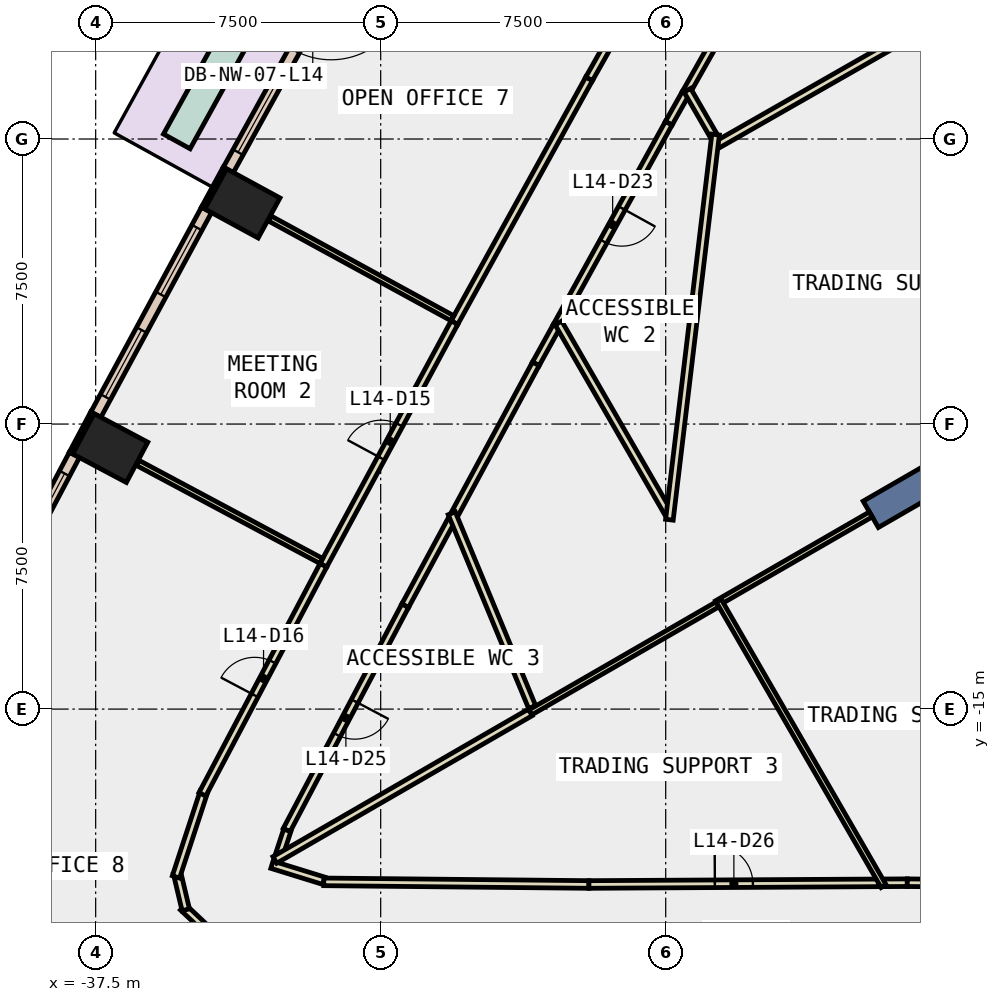
"""IFC4 building model, lengths in metres.
Left out: names, types, materials, properties, quantities, classifications, styles, units other than length and angle.
Written with IfcOpenShell. Run it as: python <this file> out.ifc"""

import sys

from ifc_helpers import new_model, si_unit, direction, frame, frame_2d, origin, origin_2d, place, context, subcontext, project, spatial, rectangle, extrude, element, fill, save


model = new_model("IFC4")
c1 = context("Model", 3, precision=1e-05, world=origin(), true_north=direction((0.0, 1.0)))
c2 = subcontext(c1, "Body", "Model", "MODEL_VIEW")
j1 = project(units=[si_unit("LENGTHUNIT", "METRE"), si_unit("PLANEANGLEUNIT", "RADIAN")], contexts=[c1])
p1 = place(None, origin())
s1 = spatial("IfcSite", under=j1, at=p1, CompositionType="ELEMENT")
p2 = place(p1, origin())
s2 = spatial("IfcBuilding", under=s1, at=p2, CompositionType="ELEMENT")
p3 = place(p2, frame((0.0, 0.0, 68.6)))
s3 = spatial("IfcBuildingStorey", under=s2, at=p3, CompositionType="ELEMENT", Elevation=68.6)
for number, where, z_axis, x_axis in (
    (1, (-33.64, -1.695, -0.4), (0.0, 0.0, 1.0), (0.478, 0.878, 0.0)),
    (2, (-37.117, -8.132, -0.4), (0.0, 0.0, 1.0), (0.469, 0.883, 0.0)),
):
    element("IfcColumn", number, at=place(p3, frame(where, z_axis=z_axis, x_axis=x_axis)), inside=s3, PredefinedType="COLUMN", context=c2, shape_type="SweptSolid", body=[
        extrude(rectangle(XDim=1.2, YDim=1.6, at=origin_2d()), origin(), (0.0, 0.0, 1.0), 4.2),
    ])
p4 = place(p3, frame((-9.31, -5.375, -0.4), z_axis=(0.0, 0.0, 1.0), x_axis=(-0.866017533419, -0.500013631625, 0.0)))
e3 = element("IfcWall", 3, at=p4, inside=s3, PredefinedType="SHEAR", context=c2, shape_type="SweptSolid", body=[
    extrude(rectangle(XDim=9.0, YDim=0.8, at=frame_2d((4.5, 0.0))), origin(), (0.0, 0.0, 1.0), 4.2),
])
p5 = place(p3, frame((-34.099, -0.762, 0.0), z_axis=(0.0, 0.0, 1.0), x_axis=(-0.478267644701, -0.878214131082, 0.0)))
e4 = element("IfcWall", 4, at=p5, inside=s3, PredefinedType="STANDARD", context=c2, shape_type="SweptSolid", body=[
    extrude(rectangle(XDim=1.2, YDim=0.1, at=frame_2d((0.6, 0.0))), origin(), (0.0, 0.0, 1.0), 3.8),
])
p6 = place(p3, frame((-37.586, -7.204, 0.0), z_axis=(0.0, 0.0, 1.0), x_axis=(-0.469467784567, -0.882949601763, 0.0)))
e5 = element("IfcWall", 5, at=p6, inside=s3, PredefinedType="STANDARD", context=c2, shape_type="SweptSolid", body=[
    extrude(rectangle(XDim=1.199, YDim=0.1, at=frame_2d((0.6, 0.0))), origin(), (0.0, 0.0, 1.0), 3.8),
])
p7 = place(p3, frame((-31.047, 4.549, 0.0), z_axis=(0.0, 0.0, 1.0), x_axis=(-0.483587271547, -0.875296150339, 0.0)))
e6 = element("IfcWall", 6, at=p7, inside=s3, PredefinedType="STANDARD", context=c2, shape_type="SweptSolid", body=[
    extrude(rectangle(XDim=6.125, YDim=0.3, at=frame_2d((3.062, 0.0))), origin(), (0.0, 0.0, 1.0), 3.8),
])
p8 = place(p7, frame((0.531, 0.0, 0.0)))
e7 = element("IfcOpeningElement", 7, at=p8, cuts=e6, PredefinedType="OPENING", context=c2, shape_type="SweptSolid", body=[
    extrude(rectangle(XDim=2.0, YDim=2.4, at=frame_2d((1.0, 1.2))), frame((0.0, 0.16, 0.0), z_axis=(0.0, -1.0, 0.0), x_axis=(1.0, 0.0, 0.0)), (0.0, 0.0, 1.0), 0.32),
])
p9 = place(p7, frame((3.594, 0.0, 0.9)))
e8 = element("IfcOpeningElement", 8, at=p9, cuts=e6, PredefinedType="OPENING", context=c2, shape_type="SweptSolid", body=[
    extrude(rectangle(XDim=2.0, YDim=2.6, at=frame_2d((1.0, 1.3))), frame((0.0, 0.16, 0.0), z_axis=(0.0, -1.0, 0.0), x_axis=(1.0, 0.0, 0.0)), (0.0, 0.0, 1.0), 0.32),
])
p10 = place(p3, frame((-34.583, -1.864, 0.0), z_axis=(0.0, 0.0, 1.0), x_axis=(-0.475413659872, -0.879762383833, 0.0)))
e9 = element("IfcWall", 9, at=p10, inside=s3, PredefinedType="STANDARD", context=c2, shape_type="SweptSolid", body=[
    extrude(rectangle(XDim=6.125, YDim=0.3, at=frame_2d((3.063, 0.0))), origin(), (0.0, 0.0, 1.0), 3.8),
])
p11 = place(p10, frame((0.531, 0.0, 0.9)))
e10 = element("IfcOpeningElement", 10, at=p11, cuts=e9, PredefinedType="OPENING", context=c2, shape_type="SweptSolid", body=[
    extrude(rectangle(XDim=2.0, YDim=2.6, at=frame_2d((1.0, 1.3))), frame((0.0, 0.16, 0.0), z_axis=(0.0, -1.0, 0.0), x_axis=(1.0, 0.0, 0.0)), (0.0, 0.0, 1.0), 0.32),
])
p12 = place(p10, frame((3.594, 0.0, 0.9)))
e11 = element("IfcOpeningElement", 11, at=p12, cuts=e9, PredefinedType="OPENING", context=c2, shape_type="SweptSolid", body=[
    extrude(rectangle(XDim=2.0, YDim=2.6, at=frame_2d((1.0, 1.3))), frame((0.0, 0.16, 0.0), z_axis=(0.0, -1.0, 0.0), x_axis=(1.0, 0.0, 0.0)), (0.0, 0.0, 1.0), 0.32),
])
p13 = place(p3, frame((-38.059, -8.31, 0.0), z_axis=(0.0, 0.0, 1.0), x_axis=(-0.467041710902, -0.884235285587, 0.0)))
e12 = element("IfcWall", 12, at=p13, inside=s3, PredefinedType="STANDARD", context=c2, shape_type="SweptSolid", body=[
    extrude(rectangle(XDim=6.22, YDim=0.3, at=frame_2d((3.11, 0.0))), origin(), (0.0, 0.0, 1.0), 3.8),
])
p14 = place(p13, frame((0.555, 0.0, 0.9)))
e13 = element("IfcOpeningElement", 13, at=p14, cuts=e12, PredefinedType="OPENING", context=c2, shape_type="SweptSolid", body=[
    extrude(rectangle(XDim=2.0, YDim=2.6, at=frame_2d((1.0, 1.3))), frame((0.0, 0.16, 0.0), z_axis=(0.0, -1.0, 0.0), x_axis=(1.0, 0.0, 0.0)), (0.0, 0.0, 1.0), 0.32),
])
p15 = place(p13, frame((3.665, 0.0, 0.9)))
e14 = element("IfcOpeningElement", 14, at=p15, cuts=e12, PredefinedType="OPENING", context=c2, shape_type="SweptSolid", body=[
    extrude(rectangle(XDim=2.0, YDim=2.6, at=frame_2d((1.0, 1.3))), frame((0.0, 0.16, 0.0), z_axis=(0.0, -1.0, 0.0), x_axis=(1.0, 0.0, 0.0)), (0.0, 0.0, 1.0), 0.32),
])
p16 = place(p3, frame((-32.404, 5.298, 0.0), z_axis=(0.0, 0.0, 1.0), x_axis=(-0.48346510207, -0.875363635914, 0.0)))
e15 = element("IfcWall", 15, at=p16, inside=s3, PredefinedType="STANDARD", context=c2, shape_type="SweptSolid", body=[
    extrude(rectangle(XDim=6.125, YDim=0.8, at=frame_2d((3.062, 0.0))), origin(), (0.0, 0.0, 1.0), 0.8),
])
p17 = place(p3, frame((-18.945, 6.567, 0.0), z_axis=(0.0, 0.0, 1.0), x_axis=(-0.491840751019, -0.87068517596, 0.0)))
e16 = element("IfcWall", 16, at=p17, inside=s3, PredefinedType="PARTITIONING", context=c2, shape_type="SweptSolid", body=[
    extrude(rectangle(XDim=6.168, YDim=0.2, at=frame_2d((3.084, 0.0))), origin(), (0.0, 0.0, 1.0), 3.8),
])
p18 = place(p17, frame((2.584, 0.0, 0.0)))
e17 = element("IfcOpeningElement", 17, at=p18, cuts=e16, PredefinedType="OPENING", context=c2, shape_type="SweptSolid", body=[
    extrude(rectangle(XDim=1.0, YDim=2.1, at=frame_2d((0.5, 1.05))), frame((0.0, 0.11, 0.0), z_axis=(0.0, -1.0, 0.0), x_axis=(1.0, 0.0, 0.0)), (0.0, 0.0, 1.0), 0.22),
])
p19 = place(p3, frame((-25.371, -4.927, 0.0), z_axis=(0.0, 0.0, 1.0), x_axis=(-0.483899488004, -0.875123582993, 0.0)))
e18 = element("IfcWall", 18, at=p19, inside=s3, PredefinedType="PARTITIONING", context=c2, shape_type="SweptSolid", body=[
    extrude(rectangle(XDim=1.13, YDim=0.2, at=frame_2d((0.565, 0.0))), origin(), (0.0, 0.0, 1.0), 3.8),
])
p20 = place(p3, frame((-25.918, -5.916, 0.0), z_axis=(0.0, 0.0, 1.0), x_axis=(-0.4752384902, -0.879857021016, 0.0)))
e19 = element("IfcWall", 19, at=p20, inside=s3, PredefinedType="PARTITIONING", context=c2, shape_type="SweptSolid", body=[
    extrude(rectangle(XDim=4.473, YDim=0.2, at=frame_2d((2.237, 0.0))), origin(), (0.0, 0.0, 1.0), 3.8),
])
p21 = place(p3, frame((-21.979, 1.196, 0.0), z_axis=(0.0, 0.0, 1.0), x_axis=(-0.491617674369, -0.870811151886, 0.0)))
e20 = element("IfcWall", 20, at=p21, inside=s3, PredefinedType="PARTITIONING", context=c2, shape_type="SweptSolid", body=[
    extrude(rectangle(XDim=0.897, YDim=0.2, at=frame_2d((0.448, 0.0))), origin(), (0.0, 0.0, 1.0), 3.8),
])
p22 = place(p3, frame((-22.42, 0.415, 0.0), z_axis=(0.0, 0.0, 1.0), x_axis=(-0.483559496818, -0.875311494861, 0.0)))
e21 = element("IfcWall", 21, at=p22, inside=s3, PredefinedType="PARTITIONING", context=c2, shape_type="SweptSolid", body=[
    extrude(rectangle(XDim=6.103, YDim=0.2, at=frame_2d((3.052, 0.0))), origin(), (0.0, 0.0, 1.0), 3.8),
])
p23 = place(p22, frame((2.552, 0.0, 0.0)))
e22 = element("IfcOpeningElement", 22, at=p23, cuts=e21, PredefinedType="OPENING", context=c2, shape_type="SweptSolid", body=[
    extrude(rectangle(XDim=1.0, YDim=2.1, at=frame_2d((0.5, 1.05))), frame((0.0, 0.11, 0.0), z_axis=(0.0, -1.0, 0.0), x_axis=(1.0, 0.0, 0.0)), (0.0, 0.0, 1.0), 0.22),
])
p24 = place(p3, frame((-16.742, -19.571, 0.0), z_axis=(0.0, 0.0, 1.0), x_axis=(0.999988034534, 0.004891910483, 0.0)))
e23 = element("IfcWall", 23, at=p24, inside=s3, PredefinedType="PARTITIONING", context=c2, shape_type="SweptSolid", body=[
    extrude(rectangle(XDim=0.599, YDim=0.2, at=frame_2d((0.299, 0.0))), origin(), (0.0, 0.0, 1.0), 3.8),
])
p25 = place(p3, frame((-16.143, -19.568, 0.0), z_axis=(0.0, 0.0, 1.0), x_axis=(0.999938688645, -0.011073344206, 0.0)))
e24 = element("IfcWall", 24, at=p25, inside=s3, PredefinedType="PARTITIONING", context=c2, shape_type="SweptSolid", body=[
    extrude(rectangle(XDim=6.218, YDim=0.2, at=frame_2d((3.109, 0.0))), origin(), (0.0, 0.0, 1.0), 3.8),
])
p26 = place(p25, frame((2.609, 0.0, 0.0)))
e25 = element("IfcOpeningElement", 25, at=p26, cuts=e24, PredefinedType="OPENING", context=c2, shape_type="SweptSolid", body=[
    extrude(rectangle(XDim=1.0, YDim=2.1, at=frame_2d((0.5, 1.05))), frame((0.0, 0.11, 0.0), z_axis=(0.0, -1.0, 0.0), x_axis=(1.0, 0.0, 0.0)), (0.0, 0.0, 1.0), 0.22),
])
p27 = place(p3, frame((-28.139, -10.028, 0.0), z_axis=(0.0, 0.0, 1.0), x_axis=(-0.475287687013, -0.879830446491, 0.0)))
e26 = element("IfcWall", 26, at=p27, inside=s3, PredefinedType="PARTITIONING", context=c2, shape_type="SweptSolid", body=[
    extrude(rectangle(XDim=2.561, YDim=0.2, at=frame_2d((1.28, 0.0))), origin(), (0.0, 0.0, 1.0), 3.8),
])
p28 = place(p3, frame((-29.356, -12.281, 0.0), z_axis=(0.0, 0.0, 1.0), x_axis=(-0.467123190417, -0.884192244353, 0.0)))
e27 = element("IfcWall", 27, at=p28, inside=s3, PredefinedType="PARTITIONING", context=c2, shape_type="SweptSolid", body=[
    extrude(rectangle(XDim=6.677, YDim=0.2, at=frame_2d((3.339, 0.0))), origin(), (0.0, 0.0, 1.0), 3.8),
])
p29 = place(p28, frame((2.839, 0.0, 0.0)))
e28 = element("IfcOpeningElement", 28, at=p29, cuts=e27, PredefinedType="OPENING", context=c2, shape_type="SweptSolid", body=[
    extrude(rectangle(XDim=1.0, YDim=2.1, at=frame_2d((0.5, 1.05))), frame((0.0, 0.11, 0.0), z_axis=(0.0, -1.0, 0.0), x_axis=(1.0, 0.0, 0.0)), (0.0, 0.0, 1.0), 0.22),
])
p30 = place(p3, frame((-32.459, -18.191, 0.0), z_axis=(0.0, 0.0, 1.0), x_axis=(-0.312158013001, -0.950030196846, 0.0)))
e29 = element("IfcWall", 29, at=p30, inside=s3, PredefinedType="PARTITIONING", context=c2, shape_type="SweptSolid", body=[
    extrude(rectangle(XDim=0.666, YDim=0.2, at=frame_2d((0.333, 0.0))), origin(), (0.0, 0.0, 1.0), 3.8),
])
p31 = place(p3, frame((-32.861, -19.095, 0.0), z_axis=(0.0, 0.0, 1.0), x_axis=(0.955301951006, -0.29563183591, 0.0)))
e30 = element("IfcWall", 30, at=p31, inside=s3, PredefinedType="PARTITIONING", context=c2, shape_type="SweptSolid", body=[
    extrude(rectangle(XDim=1.431, YDim=0.2, at=frame_2d((0.716, 0.0))), origin(), (0.0, 0.0, 1.0), 3.8),
])
p32 = place(p3, frame((-31.498, -19.546, 0.0), z_axis=(0.0, 0.0, 1.0), x_axis=(0.999950985372, -0.009900851195, 0.0)))
e31 = element("IfcWall", 31, at=p32, inside=s3, PredefinedType="PARTITIONING", context=c2, shape_type="SweptSolid", body=[
    extrude(rectangle(XDim=6.978, YDim=0.2, at=frame_2d((3.489, 0.0))), origin(), (0.0, 0.0, 1.0), 3.8),
])
p33 = place(p3, frame((-24.52, -19.615, 0.0), z_axis=(0.0, 0.0, 1.0), x_axis=(0.999984134574, 0.00563299218, 0.0)))
e32 = element("IfcWall", 32, at=p33, inside=s3, PredefinedType="PARTITIONING", context=c2, shape_type="SweptSolid", body=[
    extrude(rectangle(XDim=7.628, YDim=0.2, at=frame_2d((3.814, 0.0))), origin(), (0.0, 0.0, 1.0), 3.8),
])
p34 = place(p33, frame((3.314, 0.0, 0.0)))
e33 = element("IfcOpeningElement", 33, at=p34, cuts=e32, PredefinedType="OPENING", context=c2, shape_type="SweptSolid", body=[
    extrude(rectangle(XDim=1.0, YDim=2.1, at=frame_2d((0.5, 1.05))), frame((0.0, 0.11, 0.0), z_axis=(0.0, -1.0, 0.0), x_axis=(1.0, 0.0, 0.0)), (0.0, 0.0, 1.0), 0.22),
])
p35 = place(p3, frame((-28.06, -4.831, 0.0), z_axis=(0.0, 0.0, 1.0), x_axis=(0.483631054848, 0.875271959328, 0.0)))
e34 = element("IfcWall", 34, at=p35, inside=s3, PredefinedType="PARTITIONING", context=c2, shape_type="SweptSolid", body=[
    extrude(rectangle(XDim=7.33, YDim=0.2, at=frame_2d((3.665, 0.0))), origin(), (0.0, 0.0, 1.0), 3.8),
])
p36 = place(p3, frame((-24.515, 1.585, 0.0), z_axis=(0.0, 0.0, 1.0), x_axis=(0.49174361417, 0.870740040381, 0.0)))
e35 = element("IfcWall", 35, at=p36, inside=s3, PredefinedType="PARTITIONING", context=c2, shape_type="SweptSolid", body=[
    extrude(rectangle(XDim=7.183, YDim=0.2, at=frame_2d((3.591, 0.0))), origin(), (0.0, 0.0, 1.0), 3.8),
])
p37 = place(p36, frame((3.166, 0.0, 0.0)))
e36 = element("IfcOpeningElement", 36, at=p37, cuts=e35, PredefinedType="OPENING", context=c2, shape_type="SweptSolid", body=[
    extrude(rectangle(XDim=1.0, YDim=2.1, at=frame_2d((0.5, 1.05))), frame((0.0, 0.11, 0.0), z_axis=(0.0, -1.0, 0.0), x_axis=(1.0, 0.0, 0.0)), (0.0, 0.0, 1.0), 0.22),
])
p38 = place(p3, frame((-31.509, -11.216, 0.0), z_axis=(0.0, 0.0, 1.0), x_axis=(0.475367159168, 0.879787510701, 0.0)))
e37 = element("IfcWall", 37, at=p38, inside=s3, PredefinedType="PARTITIONING", context=c2, shape_type="SweptSolid", body=[
    extrude(rectangle(XDim=7.257, YDim=0.2, at=frame_2d((3.629, 0.0))), origin(), (0.0, 0.0, 1.0), 3.8),
])
p39 = place(p38, frame((3.203, 0.0, 0.0)))
e38 = element("IfcOpeningElement", 38, at=p39, cuts=e37, PredefinedType="OPENING", context=c2, shape_type="SweptSolid", body=[
    extrude(rectangle(XDim=1.0, YDim=2.1, at=frame_2d((0.5, 1.05))), frame((0.0, 0.11, 0.0), z_axis=(0.0, -1.0, 0.0), x_axis=(1.0, 0.0, 0.0)), (0.0, 0.0, 1.0), 0.22),
])
p40 = place(p3, frame((-34.146, -21.209, 0.0), z_axis=(0.0, 0.0, 1.0), x_axis=(-0.727092478665, 0.686539530885, 0.0)))
e39 = element("IfcWall", 39, at=p40, inside=s3, PredefinedType="PARTITIONING", context=c2, shape_type="SweptSolid", body=[
    extrude(rectangle(XDim=1.451, YDim=0.2, at=frame_2d((0.726, 0.0))), origin(), (0.0, 0.0, 1.0), 3.8),
])
p41 = place(p3, frame((-35.129, -20.281, 0.0), z_axis=(0.0, 0.0, 1.0), x_axis=(-0.230392306785, 0.973097829087, 0.0)))
e40 = element("IfcWall", 40, at=p41, inside=s3, PredefinedType="PARTITIONING", context=c2, shape_type="SweptSolid", body=[
    extrude(rectangle(XDim=0.986, YDim=0.2, at=frame_2d((0.493, 0.0))), origin(), (0.0, 0.0, 1.0), 3.8),
])
p42 = place(p3, frame((-35.387, -19.416, 0.0), z_axis=(0.0, 0.0, 1.0), x_axis=(0.31172635658, 0.950171920556, 0.0)))
e41 = element("IfcWall", 41, at=p42, inside=s3, PredefinedType="PARTITIONING", context=c2, shape_type="SweptSolid", body=[
    extrude(rectangle(XDim=2.345, YDim=0.2, at=frame_2d((1.172, 0.0))), origin(), (0.0, 0.0, 1.0), 3.8),
])
p43 = place(p3, frame((-34.692, -17.243, 0.0), z_axis=(0.0, 0.0, 1.0), x_axis=(0.467102540817, 0.884203153332, 0.0)))
e42 = element("IfcWall", 42, at=p43, inside=s3, PredefinedType="PARTITIONING", context=c2, shape_type="SweptSolid", body=[
    extrude(rectangle(XDim=6.816, YDim=0.2, at=frame_2d((3.408, 0.0))), origin(), (0.0, 0.0, 1.0), 3.8),
])
p44 = place(p43, frame((2.946, 0.0, 0.0)))
e43 = element("IfcOpeningElement", 43, at=p44, cuts=e42, PredefinedType="OPENING", context=c2, shape_type="SweptSolid", body=[
    extrude(rectangle(XDim=1.0, YDim=2.1, at=frame_2d((0.5, 1.05))), frame((0.0, 0.11, 0.0), z_axis=(0.0, -1.0, 0.0), x_axis=(1.0, 0.0, 0.0)), (0.0, 0.0, 1.0), 0.22),
])
p45 = place(p3, frame((-14.946, 3.387, 0.0), z_axis=(0.0, 0.0, 1.0), x_axis=(-0.868556003823, -0.4955910292, 0.0)))
e44 = element("IfcWall", 44, at=p45, inside=s3, PredefinedType="PARTITIONING", context=c2, shape_type="SweptSolid", body=[
    extrude(rectangle(XDim=7.199, YDim=0.2, at=frame_2d((3.6, 0.0))), origin(), (0.0, 0.0, 1.0), 3.8),
])
p46 = place(p3, frame((-21.249, 0.105, 0.0), z_axis=(0.0, 0.0, 1.0), x_axis=(-0.500442009317, 0.865770059144, 0.0)))
e45 = element("IfcWall", 45, at=p46, inside=s3, PredefinedType="PARTITIONING", context=c2, shape_type="SweptSolid", body=[
    extrude(rectangle(XDim=1.361, YDim=0.2, at=frame_2d((0.68, 0.0))), origin(), (0.0, 0.0, 1.0), 3.8),
])
p47 = place(p3, frame((-25.323, -4.84, 0.0), z_axis=(0.0, 0.0, 1.0), x_axis=(0.500070797646, -0.865984524886, 0.0)))
e46 = element("IfcWall", 46, at=p47, inside=s3, PredefinedType="PARTITIONING", context=c2, shape_type="SweptSolid", body=[
    extrude(rectangle(XDim=5.763, YDim=0.2, at=frame_2d((2.882, 0.0))), origin(), (0.0, 0.0, 1.0), 3.8),
])
p48 = place(p3, frame((-22.403, -10.017, 0.0), z_axis=(0.0, 0.0, 1.0), x_axis=(0.119143334217, 0.992877064853, 0.0)))
e47 = element("IfcWall", 47, at=p48, inside=s3, PredefinedType="PARTITIONING", context=c2, shape_type="SweptSolid", body=[
    extrude(rectangle(XDim=10.207, YDim=0.2, at=frame_2d((5.104, 0.0))), origin(), (0.0, 0.0, 1.0), 3.8),
])
p49 = place(p3, frame((-17.103, -9.878, 0.0), z_axis=(0.0, 0.0, 1.0), x_axis=(-0.866013358989, -0.500020861617, 0.0)))
e48 = element("IfcWall", 48, at=p49, inside=s3, PredefinedType="PARTITIONING", context=c2, shape_type="SweptSolid", body=[
    extrude(rectangle(XDim=4.674, YDim=0.15, at=frame_2d((2.337, 0.0))), origin(), (0.0, 0.0, 1.0), 3.8),
])
p50 = place(p3, frame((-26.015, -14.946, 0.0), z_axis=(0.0, 0.0, 1.0), x_axis=(-0.383189005855, 0.923669955012, 0.0)))
e49 = element("IfcWall", 49, at=p50, inside=s3, PredefinedType="PARTITIONING", context=c2, shape_type="SweptSolid", body=[
    extrude(rectangle(XDim=5.52, YDim=0.2, at=frame_2d((2.76, 0.0))), origin(), (0.0, 0.0, 1.0), 3.8),
])
p51 = place(p3, frame((-21.135, -12.243, 0.0), z_axis=(0.0, 0.0, 1.0), x_axis=(-0.866083439347, -0.499899465982, 0.0)))
e50 = element("IfcWall", 50, at=p51, inside=s3, PredefinedType="PARTITIONING", context=c2, shape_type="SweptSolid", body=[
    extrude(rectangle(XDim=5.691, YDim=0.15, at=frame_2d((2.846, 0.0))), origin(), (0.0, 0.0, 1.0), 3.8),
])
p52 = place(p3, frame((-16.767, -19.658, 0.0), z_axis=(0.0, 0.0, 1.0), x_axis=(-0.500083586486, 0.865977139726, 0.0)))
e51 = element("IfcWall", 51, at=p52, inside=s3, PredefinedType="PARTITIONING", context=c2, shape_type="SweptSolid", body=[
    extrude(rectangle(XDim=8.68, YDim=0.15, at=frame_2d((4.34, 0.0))), origin(), (0.0, 0.0, 1.0), 3.8),
])
p53 = place(p3, frame((-26.064, -15.088, 0.0), z_axis=(0.0, 0.0, 1.0), x_axis=(-0.865982841629, -0.500073712571, 0.0)))
e52 = element("IfcWall", 52, at=p53, inside=s3, PredefinedType="PARTITIONING", context=c2, shape_type="SweptSolid", body=[
    extrude(rectangle(XDim=7.761, YDim=0.2, at=frame_2d((3.88, 0.0))), origin(), (0.0, 0.0, 1.0), 3.8),
])
p54 = place(p3, frame((-28.111, -4.717, 0.0), z_axis=(0.0, 0.0, 1.0), x_axis=(-0.877558297547, 0.479469951515, 0.0)))
e53 = element("IfcWall", 53, at=p54, inside=s3, PredefinedType="PARTITIONING", context=c2, shape_type="SweptSolid", body=[
    extrude(rectangle(XDim=5.481, YDim=0.15, at=frame_2d((2.74, 0.0))), origin(), (0.0, 0.0, 1.0), 3.8),
])
p55 = place(p3, frame((-31.561, -11.103, 0.0), z_axis=(0.0, 0.0, 1.0), x_axis=(-0.882056805494, 0.47114306944, 0.0)))
e54 = element("IfcWall", 54, at=p55, inside=s3, PredefinedType="PARTITIONING", context=c2, shape_type="SweptSolid", body=[
    extrude(rectangle(XDim=5.48, YDim=0.15, at=frame_2d((2.74, 0.0))), origin(), (0.0, 0.0, 1.0), 3.8),
])
p56 = place(p9, origin())
e55 = element("IfcWindow", 55, at=p56, inside=s3, PartitioningType="SINGLE_PANEL", PredefinedType="WINDOW", context=c2, shape_type="SweptSolid", body=[
    extrude(rectangle(XDim=2.0, YDim=2.6, at=frame_2d((1.0, 1.3))), frame((0.0, 0.03, 0.0), z_axis=(0.0, -1.0, 0.0), x_axis=(1.0, 0.0, 0.0)), (0.0, 0.0, 1.0), 0.06),
])
fill(e8, e55)
p57 = place(p11, origin())
e56 = element("IfcWindow", 56, at=p57, inside=s3, PartitioningType="SINGLE_PANEL", PredefinedType="WINDOW", context=c2, shape_type="SweptSolid", body=[
    extrude(rectangle(XDim=2.0, YDim=2.6, at=frame_2d((1.0, 1.3))), frame((0.0, 0.03, 0.0), z_axis=(0.0, -1.0, 0.0), x_axis=(1.0, 0.0, 0.0)), (0.0, 0.0, 1.0), 0.06),
])
fill(e10, e56)
p58 = place(p12, origin())
e57 = element("IfcWindow", 57, at=p58, inside=s3, PartitioningType="SINGLE_PANEL", PredefinedType="WINDOW", context=c2, shape_type="SweptSolid", body=[
    extrude(rectangle(XDim=2.0, YDim=2.6, at=frame_2d((1.0, 1.3))), frame((0.0, 0.03, 0.0), z_axis=(0.0, -1.0, 0.0), x_axis=(1.0, 0.0, 0.0)), (0.0, 0.0, 1.0), 0.06),
])
fill(e11, e57)
p59 = place(p14, origin())
e58 = element("IfcWindow", 58, at=p59, inside=s3, PartitioningType="SINGLE_PANEL", PredefinedType="WINDOW", context=c2, shape_type="SweptSolid", body=[
    extrude(rectangle(XDim=2.0, YDim=2.6, at=frame_2d((1.0, 1.3))), frame((0.0, 0.03, 0.0), z_axis=(0.0, -1.0, 0.0), x_axis=(1.0, 0.0, 0.0)), (0.0, 0.0, 1.0), 0.06),
])
fill(e13, e58)
p60 = place(p39, origin())
e59 = element("IfcDoor", 59, at=p60, inside=s3, OperationType="SINGLE_SWING_RIGHT", PredefinedType="DOOR", context=c2, shape_type="SweptSolid", body=[
    extrude(rectangle(XDim=1.0, YDim=2.1, at=frame_2d((0.5, 1.05))), frame((0.0, 0.025, 0.0), z_axis=(0.0, -1.0, 0.0), x_axis=(1.0, 0.0, 0.0)), (0.0, 0.0, 1.0), 0.05),
])
fill(e38, e59)
p61 = place(p44, origin())
e60 = element("IfcDoor", 60, at=p61, inside=s3, OperationType="SINGLE_SWING_LEFT", PredefinedType="DOOR", context=c2, shape_type="SweptSolid", body=[
    extrude(rectangle(XDim=1.0, YDim=2.1, at=frame_2d((0.5, 1.05))), frame((0.0, 0.025, 0.0), z_axis=(0.0, -1.0, 0.0), x_axis=(1.0, 0.0, 0.0)), (0.0, 0.0, 1.0), 0.05),
])
fill(e43, e60)
p62 = place(p23, origin())
e61 = element("IfcDoor", 61, at=p62, inside=s3, OperationType="SINGLE_SWING_LEFT", PredefinedType="DOOR", context=c2, shape_type="SweptSolid", body=[
    extrude(rectangle(XDim=1.0, YDim=2.1, at=frame_2d((0.5, 1.05))), frame((0.0, 0.025, 0.0), z_axis=(0.0, -1.0, 0.0), x_axis=(1.0, 0.0, 0.0)), (0.0, 0.0, 1.0), 0.05),
])
fill(e22, e61)
p63 = place(p29, origin())
e62 = element("IfcDoor", 62, at=p63, inside=s3, OperationType="SINGLE_SWING_LEFT", PredefinedType="DOOR", context=c2, shape_type="SweptSolid", body=[
    extrude(rectangle(XDim=1.0, YDim=2.1, at=frame_2d((0.5, 1.05))), frame((0.0, 0.025, 0.0), z_axis=(0.0, -1.0, 0.0), x_axis=(1.0, 0.0, 0.0)), (0.0, 0.0, 1.0), 0.05),
])
fill(e28, e62)
p64 = place(p34, origin())
e63 = element("IfcDoor", 63, at=p64, inside=s3, OperationType="SINGLE_SWING_LEFT", PredefinedType="DOOR", context=c2, shape_type="SweptSolid", body=[
    extrude(rectangle(XDim=1.0, YDim=2.1, at=frame_2d((0.5, 1.05))), frame((0.0, 0.025, 0.0), z_axis=(0.0, -1.0, 0.0), x_axis=(1.0, 0.0, 0.0)), (0.0, 0.0, 1.0), 0.05),
])
fill(e33, e63)
save(model, sys.argv[1])
